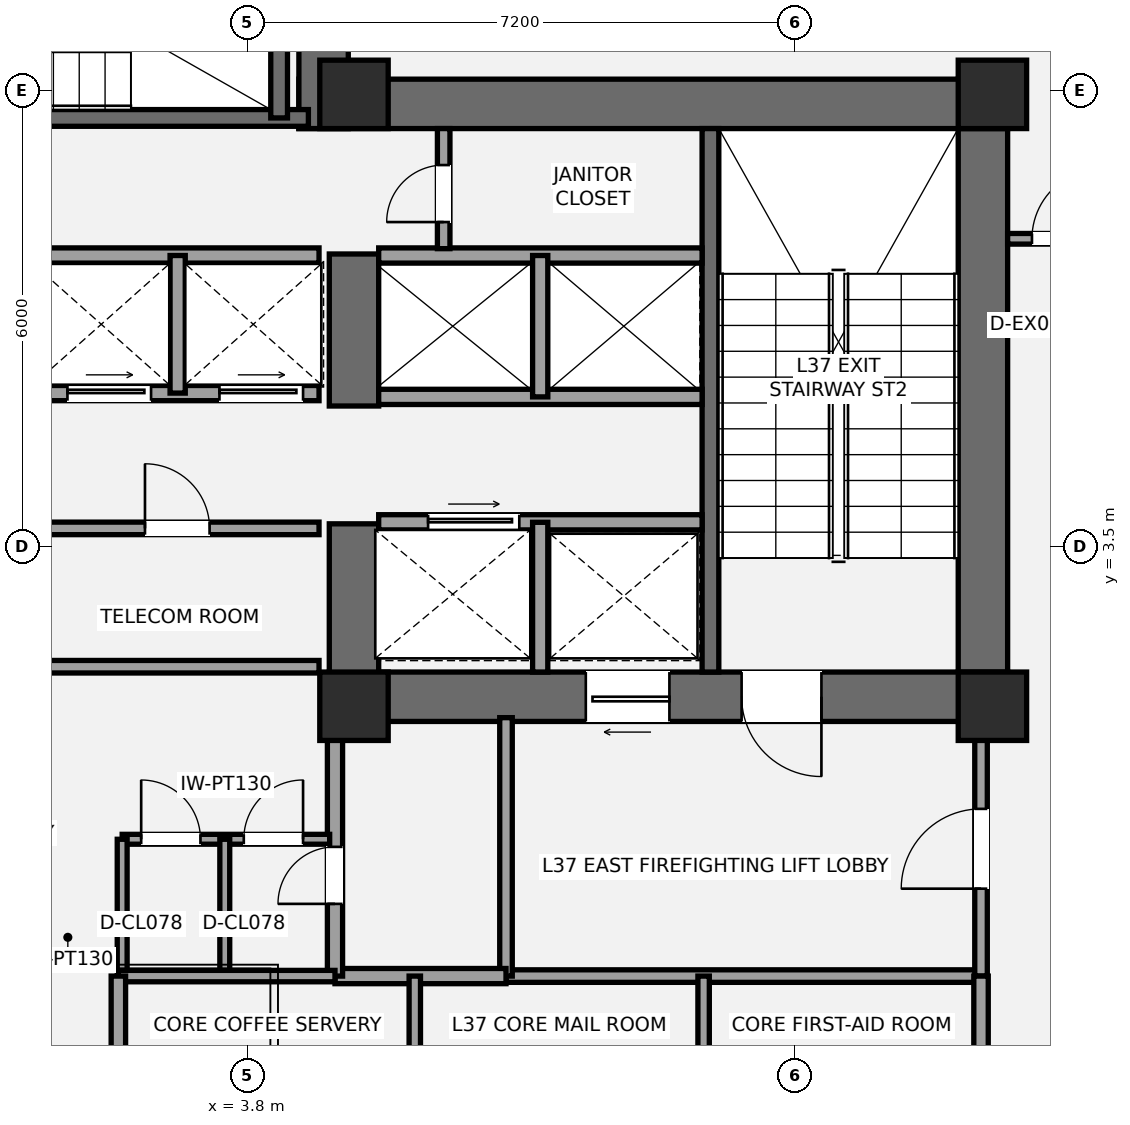
"""IFC4 building model, lengths in metres.
Left out: names, types, materials, properties, quantities, classifications, styles, units other than length and angle.
Written with IfcOpenShell. Run it as: python <this file> out.ifc"""

import sys

from ifc_helpers import new_model, si_unit, direction, frame, frame_2d, origin, origin_2d, place, context, subcontext, project, spatial, rectangle, extrude, element, fill, save


model = new_model("IFC4")
c1 = context("Model", 3, precision=1e-05, world=origin(), true_north=direction((0.0, 1.0)))
c2 = subcontext(c1, "Body", "Model", "MODEL_VIEW")
j1 = project(units=[si_unit("LENGTHUNIT", "METRE"), si_unit("PLANEANGLEUNIT", "RADIAN")], contexts=[c1])
p1 = place(None, origin())
s1 = spatial("IfcSite", under=j1, at=p1, CompositionType="ELEMENT")
p2 = place(p1, origin())
s2 = spatial("IfcBuilding", under=s1, at=p2, CompositionType="ELEMENT")
p3 = place(p2, frame((0.0, 0.0, 139.6)))
s3 = spatial("IfcBuildingStorey", under=s2, at=p3, CompositionType="ELEMENT", Elevation=139.6)
p4 = place(p3, frame((13.475, 1.2, 0.0), z_axis=(0.0, 0.0, 1.0), x_axis=(0.0, 1.0, 0.0)))
e1 = element("IfcWall", 1, at=p4, inside=s3, PredefinedType="SHEAR", context=c2, shape_type="SweptSolid", body=[
    extrude(rectangle(XDim=8.45, YDim=0.65, at=frame_2d((4.225, 0.0))), origin(), (0.0, 0.0, 1.0), 4.2),
])
p5 = place(p3, frame((4.475, 9.325, 0.0), z_axis=(0.0, 0.0, 1.0), x_axis=(1.0, 0.0, 0.0)))
e2 = element("IfcWall", 2, at=p5, inside=s3, PredefinedType="SHEAR", context=c2, shape_type="SweptSolid", body=[
    extrude(rectangle(XDim=9.325, YDim=0.65, at=frame_2d((4.663, 0.0))), origin(), (0.0, 0.0, 1.0), 4.2),
])
p6 = place(p3, frame((13.8, 1.525, 0.0), z_axis=(0.0, 0.0, 1.0), x_axis=(-1.0, 0.0, 0.0)))
e3 = element("IfcWall", 3, at=p6, inside=s3, PredefinedType="SHEAR", context=c2, shape_type="SweptSolid", body=[
    extrude(rectangle(XDim=8.925, YDim=0.65, at=frame_2d((4.462, 0.0))), origin(), (0.0, 0.0, 1.0), 4.2),
])
p7 = place(p6, frame((2.45, 0.0, 0.0)))
e4 = element("IfcOpeningElement", 4, at=p7, cuts=e3, PredefinedType="OPENING", context=c2, shape_type="SweptSolid", body=[
    extrude(rectangle(XDim=1.05, YDim=2.15, at=frame_2d((0.525, 1.075))), frame((0.0, 0.335, 0.0), z_axis=(0.0, -1.0, 0.0), x_axis=(1.0, 0.0, 0.0)), (0.0, 0.0, 1.0), 0.67),
])
p8 = place(p6, frame((4.45, 0.0, 0.0)))
e5 = element("IfcOpeningElement", 5, at=p8, cuts=e3, PredefinedType="OPENING", context=c2, shape_type="SweptSolid", body=[
    extrude(rectangle(XDim=1.1, YDim=2.2, at=frame_2d((0.55, 1.1))), frame((0.0, 0.335, 0.0), z_axis=(0.0, -1.0, 0.0), x_axis=(1.0, 0.0, 0.0)), (0.0, 0.0, 1.0), 0.67),
])
p9 = place(p3, frame((5.2, 1.2, 0.0), z_axis=(0.0, 0.0, 1.0), x_axis=(0.0, 1.0, 0.0)))
e6 = element("IfcWall", 6, at=p9, inside=s3, PredefinedType="SHEAR", context=c2, shape_type="SweptSolid", body=[
    extrude(rectangle(XDim=2.6, YDim=0.65, at=frame_2d((1.3, 0.0))), origin(), (0.0, 0.0, 1.0), 4.2),
])
p10 = place(p3, frame((5.2, 5.35, 0.0), z_axis=(0.0, 0.0, 1.0), x_axis=(0.0, 1.0, 0.0)))
e7 = element("IfcWall", 7, at=p10, inside=s3, PredefinedType="SHEAR", context=c2, shape_type="SweptSolid", body=[
    extrude(rectangle(XDim=2.0, YDim=0.65, at=frame_2d((1.0, 0.0))), origin(), (0.0, 0.0, 1.0), 4.2),
])
p11 = place(p3, frame((9.89, 1.85, 0.0), z_axis=(0.0, 0.0, 1.0), x_axis=(0.0, 1.0, 0.0)))
e8 = element("IfcWall", 8, at=p11, inside=s3, PredefinedType="SHEAR", context=c2, shape_type="SweptSolid", body=[
    extrude(rectangle(XDim=7.15, YDim=0.22, at=frame_2d((3.575, 0.0))), origin(), (0.0, 0.0, 1.0), 4.2),
])
p12 = place(p3, frame((4.8, 9.0, 0.0), z_axis=(0.0, 0.0, 1.0), x_axis=(0.0, 1.0, 0.0)))
e9 = element("IfcWall", 9, at=p12, inside=s3, PredefinedType="SHEAR", context=c2, shape_type="SweptSolid", body=[
    extrude(rectangle(XDim=4.05, YDim=0.65, at=frame_2d((2.025, 0.0))), origin(), (0.0, 0.0, 1.0), 4.2),
])
p13 = place(p3, frame((-4.7, 9.14, 0.0), z_axis=(0.0, 0.0, 1.0), x_axis=(1.0, 0.0, 0.0)))
e10 = element("IfcWall", 10, at=p13, inside=s3, PredefinedType="SHEAR", context=c2, shape_type="SweptSolid", body=[
    extrude(rectangle(XDim=9.3, YDim=0.22, at=frame_2d((4.65, 0.0))), origin(), (0.0, 0.0, 1.0), 4.2),
])
p14 = place(p13, frame((1.15, 0.0, 0.0)))
e11 = element("IfcOpeningElement", 11, at=p14, cuts=e10, PredefinedType="OPENING", context=c2, shape_type="SweptSolid", body=[
    extrude(rectangle(XDim=1.05, YDim=2.15, at=frame_2d((0.525, 1.075))), frame((0.0, 0.12, 0.0), z_axis=(0.0, -1.0, 0.0), x_axis=(1.0, 0.0, 0.0)), (0.0, 0.0, 1.0), 0.24),
])
p15 = place(p3, frame((4.215, 9.14, 0.0), z_axis=(0.0, 0.0, 1.0), x_axis=(0.0, 1.0, 0.0)))
e12 = element("IfcWall", 12, at=p15, inside=s3, PredefinedType="SHEAR", context=c2, shape_type="SweptSolid", body=[
    extrude(rectangle(XDim=3.26, YDim=0.22, at=frame_2d((1.63, 0.0))), origin(), (0.0, 0.0, 1.0), 4.2),
])
for number, where, z_axis, x_axis in (
    (13, (5.2, 1.4, 0.0), (0.0, 0.0, 1.0), (1.0, 0.0, 0.0)),
    (14, (5.2, 9.45, 0.0), (0.0, 0.0, 1.0), (1.0, 0.0, 0.0)),
    (15, (13.6, 1.4, 0.0), (0.0, 0.0, 1.0), (1.0, 0.0, 0.0)),
    (16, (13.6, 9.45, 0.0), (0.0, 0.0, 1.0), (1.0, 0.0, 0.0)),
):
    element("IfcColumn", number, at=place(p3, frame(where, z_axis=z_axis, x_axis=x_axis)), inside=s3, PredefinedType="COLUMN", context=c2, shape_type="SweptSolid", body=[
        extrude(rectangle(XDim=0.9, YDim=0.9, at=origin_2d()), origin(), (0.0, 0.0, 1.0), 4.2),
    ])
p16 = place(p3, frame((7.2, -2.15, 0.0), z_axis=(0.0, 0.0, 1.0), x_axis=(1.0, 0.0, 0.0)))
e17 = element("IfcWall", 17, at=p16, inside=s3, PredefinedType="PARTITIONING", context=c2, shape_type="SweptSolid", body=[
    extrude(rectangle(XDim=6.25, YDim=0.165, at=frame_2d((3.125, 0.0))), origin(), (0.0, 0.0, 1.0), 4.02),
])
p17 = place(p3, frame((7.2, -2.15, 0.0), z_axis=(0.0, 0.0, 1.0), x_axis=(0.0, 1.0, 0.0)))
e18 = element("IfcWall", 18, at=p17, inside=s3, PredefinedType="PARTITIONING", context=c2, shape_type="SweptSolid", body=[
    extrude(rectangle(XDim=3.4, YDim=0.165, at=frame_2d((1.7, 0.0))), origin(), (0.0, 0.0, 1.0), 3.473),
])
p18 = place(p3, frame((13.45, -2.15, 0.0), z_axis=(0.0, 0.0, 1.0), x_axis=(0.0, 1.0, 0.0)))
e19 = element("IfcWall", 19, at=p18, inside=s3, PredefinedType="PARTITIONING", context=c2, shape_type="SweptSolid", body=[
    extrude(rectangle(XDim=3.4, YDim=0.165, at=frame_2d((1.7, 0.0))), origin(), (0.0, 0.0, 1.0), 3.473),
])
p19 = place(p18, frame((1.15, 0.0, 0.0)))
e20 = element("IfcOpeningElement", 20, at=p19, cuts=e19, PredefinedType="OPENING", context=c2, shape_type="SweptSolid", body=[
    extrude(rectangle(XDim=1.05, YDim=2.15, at=frame_2d((0.525, 1.075))), frame((0.0, 0.093, 0.0), z_axis=(0.0, -1.0, 0.0), x_axis=(1.0, 0.0, 0.0)), (0.0, 0.0, 1.0), 0.185),
])
p20 = place(p3, frame((4.95, -2.15, 0.0), z_axis=(0.0, 0.0, 1.0), x_axis=(1.0, 0.0, 0.0)))
e21 = element("IfcWall", 21, at=p20, inside=s3, PredefinedType="SOLIDWALL", context=c2, shape_type="SweptSolid", body=[
    extrude(rectangle(XDim=2.25, YDim=0.2, at=frame_2d((1.125, 0.0))), origin(), (0.0, 0.0, 1.0), 4.02),
])
p21 = place(p3, frame((4.95, -2.15, 0.0), z_axis=(0.0, 0.0, 1.0), x_axis=(0.0, 1.0, 0.0)))
e22 = element("IfcWall", 22, at=p21, inside=s3, PredefinedType="SOLIDWALL", context=c2, shape_type="SweptSolid", body=[
    extrude(rectangle(XDim=3.4, YDim=0.2, at=frame_2d((1.7, 0.0))), origin(), (0.0, 0.0, 1.0), 3.473),
])
p22 = place(p21, frame((0.95, 0.0, 0.0)))
e23 = element("IfcOpeningElement", 23, at=p22, cuts=e22, PredefinedType="OPENING", context=c2, shape_type="SweptSolid", body=[
    extrude(rectangle(XDim=0.75, YDim=2.1, at=frame_2d((0.375, 1.05))), frame((0.0, 0.11, 0.0), z_axis=(0.0, -1.0, 0.0), x_axis=(1.0, 0.0, 0.0)), (0.0, 0.0, 1.0), 0.22),
])
p23 = place(p3, frame((2.15, -0.35, 0.0), z_axis=(0.0, 0.0, 1.0), x_axis=(1.0, 0.0, 0.0)))
e24 = element("IfcWall", 24, at=p23, inside=s3, PredefinedType="PARTITIONING", context=c2, shape_type="SweptSolid", body=[
    extrude(rectangle(XDim=2.73, YDim=0.13, at=frame_2d((1.365, 0.0))), origin(), (0.0, 0.0, 1.0), 4.02),
])
p24 = place(p23, frame((0.25, 0.0, 0.0)))
e25 = element("IfcOpeningElement", 25, at=p24, cuts=e24, PredefinedType="OPENING", context=c2, shape_type="SweptSolid", body=[
    extrude(rectangle(XDim=0.78, YDim=2.1, at=frame_2d((0.39, 1.05))), frame((0.0, 0.075, 0.0), z_axis=(0.0, -1.0, 0.0), x_axis=(1.0, 0.0, 0.0)), (0.0, 0.0, 1.0), 0.15),
])
p25 = place(p23, frame((1.6, 0.0, 0.0)))
e26 = element("IfcOpeningElement", 26, at=p25, cuts=e24, PredefinedType="OPENING", context=c2, shape_type="SweptSolid", body=[
    extrude(rectangle(XDim=0.78, YDim=2.1, at=frame_2d((0.39, 1.05))), frame((0.0, 0.075, 0.0), z_axis=(0.0, -1.0, 0.0), x_axis=(1.0, 0.0, 0.0)), (0.0, 0.0, 1.0), 0.15),
])
for number, where, z_axis, x_axis in (
    (27, (2.15, -2.15, 0.0), (0.0, 0.0, 1.0), (0.0, 1.0, 0.0)),
    (28, (3.5, -2.15, 0.0), (0.0, 0.0, 1.0), (0.0, 1.0, 0.0)),
):
    element("IfcWall", number, at=place(p3, frame(where, z_axis=z_axis, x_axis=x_axis)), inside=s3, PredefinedType="PARTITIONING", context=c2, shape_type="SweptSolid", body=[
        extrude(rectangle(XDim=1.8, YDim=0.13, at=frame_2d((0.9, 0.0))), origin(), (0.0, 0.0, 1.0), 4.02),
    ])
p26 = place(p3, frame((5.525, 3.82, 0.0), z_axis=(0.0, 0.0, 1.0), x_axis=(1.0, 0.0, 0.0)))
e29 = element("IfcWall", 29, at=p26, inside=s3, PredefinedType="SOLIDWALL", context=c2, shape_type="SweptSolid", body=[
    extrude(rectangle(XDim=4.255, YDim=0.2, at=frame_2d((2.127, 0.0))), origin(), (0.0, 0.0, 1.0), 4.02),
])
p27 = place(p26, frame((0.65, 0.0, 0.0)))
e30 = element("IfcOpeningElement", 30, at=p27, cuts=e29, PredefinedType="OPENING", context=c2, shape_type="SweptSolid", body=[
    extrude(rectangle(XDim=1.2, YDim=2.2, at=frame_2d((0.6, 1.1))), frame((0.0, 0.11, 0.0), z_axis=(0.0, -1.0, 0.0), x_axis=(1.0, 0.0, 0.0)), (0.0, 0.0, 1.0), 0.22),
])
p28 = place(p3, frame((7.65, 1.85, 0.0), z_axis=(0.0, 0.0, 1.0), x_axis=(0.0, 1.0, 0.0)))
e31 = element("IfcWall", 31, at=p28, inside=s3, PredefinedType="SOLIDWALL", context=c2, shape_type="SweptSolid", body=[
    extrude(rectangle(XDim=1.97, YDim=0.2, at=frame_2d((0.985, 0.0))), origin(), (0.0, 0.0, 1.0), 4.02),
])
for number, where, z_axis, x_axis in (
    (32, (5.525, 5.47, 0.0), (0.0, 0.0, 1.0), (1.0, 0.0, 0.0)),
    (33, (5.525, 7.33, 0.0), (0.0, 0.0, 1.0), (1.0, 0.0, 0.0)),
):
    element("IfcWall", number, at=place(p3, frame(where, z_axis=z_axis, x_axis=x_axis)), inside=s3, PredefinedType="SOLIDWALL", context=c2, shape_type="SweptSolid", body=[
        extrude(rectangle(XDim=4.255, YDim=0.2, at=frame_2d((2.127, 0.0))), origin(), (0.0, 0.0, 1.0), 4.02),
    ])
p29 = place(p3, frame((7.65, 5.47, 0.0), z_axis=(0.0, 0.0, 1.0), x_axis=(0.0, 1.0, 0.0)))
e34 = element("IfcWall", 34, at=p29, inside=s3, PredefinedType="SOLIDWALL", context=c2, shape_type="SweptSolid", body=[
    extrude(rectangle(XDim=1.86, YDim=0.2, at=frame_2d((0.93, 0.0))), origin(), (0.0, 0.0, 1.0), 4.02),
])
p30 = place(p3, frame((0.85, 1.92, 0.0), z_axis=(0.0, 0.0, 1.0), x_axis=(1.0, 0.0, 0.0)))
e35 = element("IfcWall", 35, at=p30, inside=s3, PredefinedType="PARTITIONING", context=c2, shape_type="SweptSolid", body=[
    extrude(rectangle(XDim=3.89, YDim=0.165, at=frame_2d((1.945, 0.0))), origin(), (0.0, 0.0, 1.0), 3.16),
])
p31 = place(p3, frame((0.85, 3.74, 0.0), z_axis=(0.0, 0.0, 1.0), x_axis=(1.0, 0.0, 0.0)))
e36 = element("IfcWall", 36, at=p31, inside=s3, PredefinedType="PARTITIONING", context=c2, shape_type="SweptSolid", body=[
    extrude(rectangle(XDim=3.89, YDim=0.165, at=frame_2d((1.945, 0.0))), origin(), (0.0, 0.0, 1.0), 4.02),
])
p32 = place(p31, frame((1.6, 0.0, 0.0)))
e37 = element("IfcOpeningElement", 37, at=p32, cuts=e36, PredefinedType="OPENING", context=c2, shape_type="SweptSolid", body=[
    extrude(rectangle(XDim=0.85, YDim=2.1, at=frame_2d((0.425, 1.05))), frame((0.0, 0.093, 0.0), z_axis=(0.0, -1.0, 0.0), x_axis=(1.0, 0.0, 0.0)), (0.0, 0.0, 1.0), 0.185),
])
p33 = place(p3, frame((0.88, 5.52, 0.0), z_axis=(0.0, 0.0, 1.0), x_axis=(1.0, 0.0, 0.0)))
e38 = element("IfcWall", 38, at=p33, inside=s3, PredefinedType="SOLIDWALL", context=c2, shape_type="SweptSolid", body=[
    extrude(rectangle(XDim=3.86, YDim=0.2, at=frame_2d((1.93, 0.0))), origin(), (0.0, 0.0, 1.0), 4.02),
])
p34 = place(p33, frame((0.55, 0.0, 0.0)))
e39 = element("IfcOpeningElement", 39, at=p34, cuts=e38, PredefinedType="OPENING", context=c2, shape_type="SweptSolid", body=[
    extrude(rectangle(XDim=1.1, YDim=2.2, at=frame_2d((0.55, 1.1))), frame((0.0, 0.11, 0.0), z_axis=(0.0, -1.0, 0.0), x_axis=(1.0, 0.0, 0.0)), (0.0, 0.0, 1.0), 0.22),
])
p35 = place(p33, frame((2.55, 0.0, 0.0)))
e40 = element("IfcOpeningElement", 40, at=p35, cuts=e38, PredefinedType="OPENING", context=c2, shape_type="SweptSolid", body=[
    extrude(rectangle(XDim=1.1, YDim=2.2, at=frame_2d((0.55, 1.1))), frame((0.0, 0.11, 0.0), z_axis=(0.0, -1.0, 0.0), x_axis=(1.0, 0.0, 0.0)), (0.0, 0.0, 1.0), 0.22),
])
p36 = place(p3, frame((0.88, 7.33, 0.0), z_axis=(0.0, 0.0, 1.0), x_axis=(1.0, 0.0, 0.0)))
e41 = element("IfcWall", 41, at=p36, inside=s3, PredefinedType="SOLIDWALL", context=c2, shape_type="SweptSolid", body=[
    extrude(rectangle(XDim=3.86, YDim=0.2, at=frame_2d((1.93, 0.0))), origin(), (0.0, 0.0, 1.0), 4.02),
])
p37 = place(p3, frame((2.88, 5.52, 0.0), z_axis=(0.0, 0.0, 1.0), x_axis=(0.0, 1.0, 0.0)))
e42 = element("IfcWall", 42, at=p37, inside=s3, PredefinedType="SOLIDWALL", context=c2, shape_type="SweptSolid", body=[
    extrude(rectangle(XDim=1.81, YDim=0.2, at=frame_2d((0.905, 0.0))), origin(), (0.0, 0.0, 1.0), 4.02),
])
p38 = place(p3, frame((6.38, 7.42, 0.0), z_axis=(0.0, 0.0, 1.0), x_axis=(0.0, 1.0, 0.0)))
e43 = element("IfcWall", 43, at=p38, inside=s3, PredefinedType="PARTITIONING", context=c2, shape_type="SweptSolid", body=[
    extrude(rectangle(XDim=1.58, YDim=0.165, at=frame_2d((0.79, 0.0))), origin(), (0.0, 0.0, 1.0), 4.02),
])
p39 = place(p38, frame((0.35, 0.0, 0.0)))
e44 = element("IfcOpeningElement", 44, at=p39, cuts=e43, PredefinedType="OPENING", context=c2, shape_type="SweptSolid", body=[
    extrude(rectangle(XDim=0.75, YDim=2.1, at=frame_2d((0.375, 1.05))), frame((0.0, 0.093, 0.0), z_axis=(0.0, -1.0, 0.0), x_axis=(1.0, 0.0, 0.0)), (0.0, 0.0, 1.0), 0.185),
])
p40 = place(p3, frame((2.1, -2.15, 0.0), z_axis=(0.0, 0.0, 1.0), x_axis=(1.0, 0.0, 0.0)))
e45 = element("IfcWall", 45, at=p40, inside=s3, PredefinedType="PLUMBINGWALL", context=c2, shape_type="SweptSolid", body=[
    extrude(rectangle(XDim=2.85, YDim=0.15, at=frame_2d((1.425, 0.0))), origin(), (0.0, 0.0, 1.0), 4.02),
])
p41 = place(p3, frame((2.1, -4.05, 0.0), z_axis=(0.0, 0.0, 1.0), x_axis=(0.0, 1.0, 0.0)))
e46 = element("IfcWall", 46, at=p41, inside=s3, PredefinedType="PLUMBINGWALL", context=c2, shape_type="SweptSolid", body=[
    extrude(rectangle(XDim=1.9, YDim=0.19, at=frame_2d((0.95, 0.0))), origin(), (0.0, 0.0, 1.0), 4.02),
])
p42 = place(p3, frame((13.45, -4.05, 0.0), z_axis=(0.0, 0.0, 1.0), x_axis=(0.0, 1.0, 0.0)))
e47 = element("IfcWall", 47, at=p42, inside=s3, PredefinedType="PLUMBINGWALL", context=c2, shape_type="SweptSolid", body=[
    extrude(rectangle(XDim=1.9, YDim=0.19, at=frame_2d((0.95, 0.0))), origin(), (0.0, 0.0, 1.0), 3.473),
])
p43 = place(p3, frame((6.0, -4.05, 0.0), z_axis=(0.0, 0.0, 1.0), x_axis=(0.0, 1.0, 0.0)))
e48 = element("IfcWall", 48, at=p43, inside=s3, PredefinedType="PLUMBINGWALL", context=c2, shape_type="SweptSolid", body=[
    extrude(rectangle(XDim=1.9, YDim=0.15, at=frame_2d((0.95, 0.0))), origin(), (0.0, 0.0, 1.0), 3.473),
])
p44 = place(p3, frame((9.8, -4.05, 0.0), z_axis=(0.0, 0.0, 1.0), x_axis=(0.0, 1.0, 0.0)))
e49 = element("IfcWall", 49, at=p44, inside=s3, PredefinedType="PLUMBINGWALL", context=c2, shape_type="SweptSolid", body=[
    extrude(rectangle(XDim=1.9, YDim=0.15, at=frame_2d((0.95, 0.0))), origin(), (0.0, 0.0, 1.0), 4.02),
])
p45 = place(p3, frame((13.8, 7.55, 0.0), z_axis=(0.0, 0.0, 1.0), x_axis=(1.0, 0.0, 0.0)))
e50 = element("IfcWall", 50, at=p45, inside=s3, PredefinedType="PARTITIONING", context=c2, shape_type="SweptSolid", body=[
    extrude(rectangle(XDim=1.9, YDim=0.14, at=frame_2d((0.95, 0.0))), origin(), (0.0, 0.0, 1.0), 3.473),
])
p46 = place(p45, frame((0.32, 0.0, 0.0)))
e51 = element("IfcOpeningElement", 51, at=p46, cuts=e50, PredefinedType="OPENING", context=c2, shape_type="SweptSolid", body=[
    extrude(rectangle(XDim=0.92, YDim=2.15, at=frame_2d((0.46, 1.075))), frame((0.0, 0.08, 0.0), z_axis=(0.0, -1.0, 0.0), x_axis=(1.0, 0.0, 0.0)), (0.0, 0.0, 1.0), 0.16),
])
p47 = place(p7, origin())
e52 = element("IfcDoor", 52, at=p47, inside=s3, OperationType="SINGLE_SWING_LEFT", PredefinedType="DOOR", context=c2, shape_type="SweptSolid", body=[
    extrude(rectangle(XDim=1.05, YDim=2.15, at=frame_2d((0.525, 1.075))), frame((0.0, 0.025, 0.0), z_axis=(0.0, -1.0, 0.0), x_axis=(1.0, 0.0, 0.0)), (0.0, 0.0, 1.0), 0.05),
])
fill(e4, e52)
p48 = place(p19, origin())
e53 = element("IfcDoor", 53, at=p48, inside=s3, OperationType="SINGLE_SWING_LEFT", PredefinedType="DOOR", context=c2, shape_type="SweptSolid", body=[
    extrude(rectangle(XDim=1.05, YDim=2.15, at=frame_2d((0.525, 1.075))), frame((0.0, 0.025, 0.0), z_axis=(0.0, -1.0, 0.0), x_axis=(1.0, 0.0, 0.0)), (0.0, 0.0, 1.0), 0.05),
])
fill(e20, e53)
p49 = place(p22, origin())
e54 = element("IfcDoor", 54, at=p49, inside=s3, OperationType="SINGLE_SWING_LEFT", PredefinedType="DOOR", context=c2, shape_type="SweptSolid", body=[
    extrude(rectangle(XDim=0.75, YDim=2.1, at=frame_2d((0.375, 1.05))), frame((0.0, 0.025, 0.0), z_axis=(0.0, -1.0, 0.0), x_axis=(1.0, 0.0, 0.0)), (0.0, 0.0, 1.0), 0.05),
])
fill(e23, e54)
p50 = place(p24, origin())
e55 = element("IfcDoor", 55, at=p50, inside=s3, OperationType="SINGLE_SWING_LEFT", PredefinedType="DOOR", context=c2, shape_type="SweptSolid", body=[
    extrude(rectangle(XDim=0.78, YDim=2.1, at=frame_2d((0.39, 1.05))), frame((0.0, 0.025, 0.0), z_axis=(0.0, -1.0, 0.0), x_axis=(1.0, 0.0, 0.0)), (0.0, 0.0, 1.0), 0.05),
])
fill(e25, e55)
p51 = place(p25, origin())
e56 = element("IfcDoor", 56, at=p51, inside=s3, OperationType="SINGLE_SWING_RIGHT", PredefinedType="DOOR", context=c2, shape_type="SweptSolid", body=[
    extrude(rectangle(XDim=0.78, YDim=2.1, at=frame_2d((0.39, 1.05))), frame((0.0, 0.025, 0.0), z_axis=(0.0, -1.0, 0.0), x_axis=(1.0, 0.0, 0.0)), (0.0, 0.0, 1.0), 0.05),
])
fill(e26, e56)
p52 = place(p8, origin())
e57 = element("IfcDoor", 57, at=p52, inside=s3, OperationType="SLIDING_TO_LEFT", PredefinedType="DOOR", context=c2, shape_type="SweptSolid", body=[
    extrude(rectangle(XDim=1.1, YDim=2.2, at=frame_2d((0.55, 1.1))), frame((0.0, 0.025, 0.0), z_axis=(0.0, -1.0, 0.0), x_axis=(1.0, 0.0, 0.0)), (0.0, 0.0, 1.0), 0.05),
])
fill(e5, e57)
p53 = place(p27, origin())
e58 = element("IfcDoor", 58, at=p53, inside=s3, OperationType="SLIDING_TO_RIGHT", PredefinedType="DOOR", context=c2, shape_type="SweptSolid", body=[
    extrude(rectangle(XDim=1.2, YDim=2.2, at=frame_2d((0.6, 1.1))), frame((0.0, 0.025, 0.0), z_axis=(0.0, -1.0, 0.0), x_axis=(1.0, 0.0, 0.0)), (0.0, 0.0, 1.0), 0.05),
])
fill(e30, e58)
p54 = place(p32, origin())
e59 = element("IfcDoor", 59, at=p54, inside=s3, OperationType="SINGLE_SWING_LEFT", PredefinedType="DOOR", context=c2, shape_type="SweptSolid", body=[
    extrude(rectangle(XDim=0.85, YDim=2.1, at=frame_2d((0.425, 1.05))), frame((0.0, 0.025, 0.0), z_axis=(0.0, -1.0, 0.0), x_axis=(1.0, 0.0, 0.0)), (0.0, 0.0, 1.0), 0.05),
])
fill(e37, e59)
p55 = place(p34, origin())
e60 = element("IfcDoor", 60, at=p55, inside=s3, OperationType="SLIDING_TO_LEFT", PredefinedType="DOOR", context=c2, shape_type="SweptSolid", body=[
    extrude(rectangle(XDim=1.1, YDim=2.2, at=frame_2d((0.55, 1.1))), frame((0.0, 0.025, 0.0), z_axis=(0.0, -1.0, 0.0), x_axis=(1.0, 0.0, 0.0)), (0.0, 0.0, 1.0), 0.05),
])
fill(e39, e60)
p56 = place(p35, origin())
e61 = element("IfcDoor", 61, at=p56, inside=s3, OperationType="SLIDING_TO_LEFT", PredefinedType="DOOR", context=c2, shape_type="SweptSolid", body=[
    extrude(rectangle(XDim=1.1, YDim=2.2, at=frame_2d((0.55, 1.1))), frame((0.0, 0.025, 0.0), z_axis=(0.0, -1.0, 0.0), x_axis=(1.0, 0.0, 0.0)), (0.0, 0.0, 1.0), 0.05),
])
fill(e40, e61)
p57 = place(p39, origin())
e62 = element("IfcDoor", 62, at=p57, inside=s3, OperationType="SINGLE_SWING_LEFT", PredefinedType="DOOR", context=c2, shape_type="SweptSolid", body=[
    extrude(rectangle(XDim=0.75, YDim=2.1, at=frame_2d((0.375, 1.05))), frame((0.0, 0.025, 0.0), z_axis=(0.0, -1.0, 0.0), x_axis=(1.0, 0.0, 0.0)), (0.0, 0.0, 1.0), 0.05),
])
fill(e44, e62)
p58 = place(p46, origin())
e63 = element("IfcDoor", 63, at=p58, inside=s3, OperationType="SINGLE_SWING_RIGHT", PredefinedType="DOOR", context=c2, shape_type="SweptSolid", body=[
    extrude(rectangle(XDim=0.92, YDim=2.15, at=frame_2d((0.46, 1.075))), frame((0.0, 0.025, 0.0), z_axis=(0.0, -1.0, 0.0), x_axis=(1.0, 0.0, 0.0)), (0.0, 0.0, 1.0), 0.05),
])
fill(e51, e63)
save(model, sys.argv[1])
